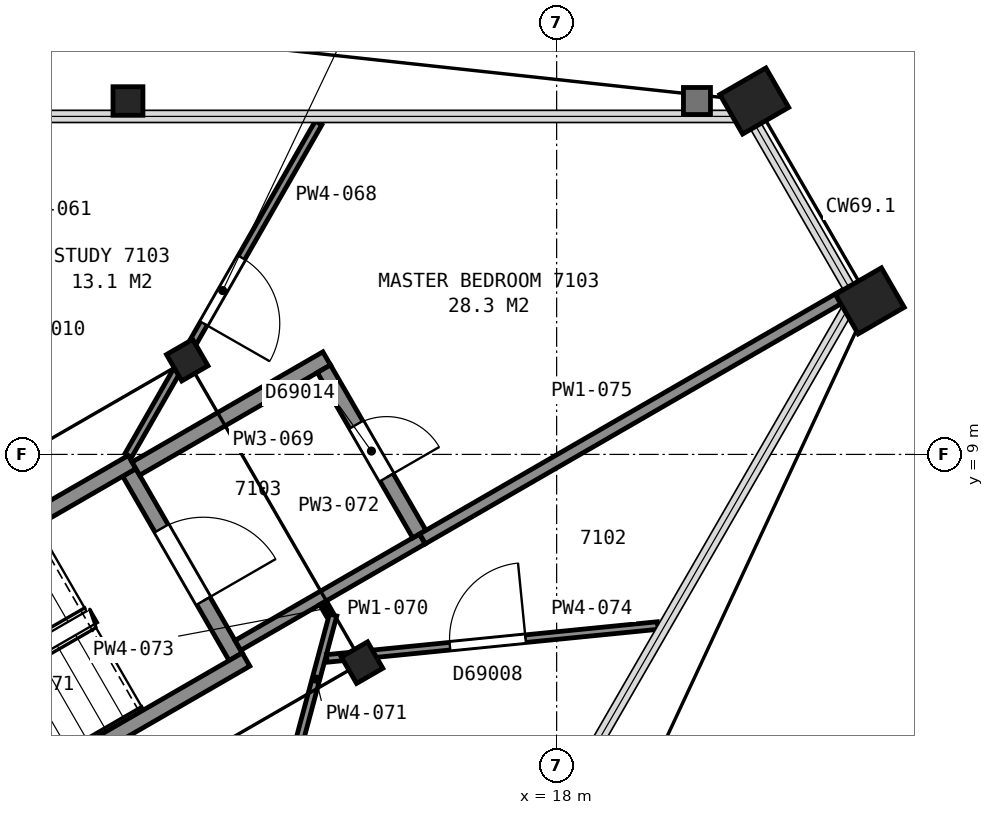
"""IFC4 building model, lengths in metres.
Left out: names, types, materials, properties, quantities, classifications, styles, units other than length and angle.
Written with IfcOpenShell. Run it as: python <this file> out.ifc"""

import sys

from ifc_helpers import new_model, si_unit, direction, frame, frame_2d, origin, origin_2d, place, context, subcontext, project, spatial, rectangle, hollow_rectangle, i_section, extrude, element, fill, save


model = new_model("IFC4")
c1 = context("Model", 3, precision=1e-05, world=origin(), true_north=direction((0.0, 1.0)))
c2 = subcontext(c1, "Body", "Model", "MODEL_VIEW")
j1 = project(units=[si_unit("LENGTHUNIT", "METRE"), si_unit("PLANEANGLEUNIT", "RADIAN")], contexts=[c1])
p1 = place(None, origin())
s1 = spatial("IfcSite", under=j1, at=p1, CompositionType="ELEMENT")
p2 = place(p1, origin())
s2 = spatial("IfcBuilding", under=s1, at=p2, CompositionType="ELEMENT")
p3 = place(p2, frame((0.0, 0.0, 282.5)))
s3 = spatial("IfcBuildingStorey", under=s2, at=p3, CompositionType="ELEMENT", Elevation=282.5)
p4 = place(p3, frame((20.6, 13.65, 0.0), z_axis=(0.0, 0.0, 1.0), x_axis=(0.5, -0.866025403784, 0.0)))
e1 = element("IfcColumn", 1, at=p4, inside=s3, PredefinedType="COLUMN", context=c2, shape_type="SweptSolid", body=[
    extrude(hollow_rectangle(XDim=0.6, YDim=0.7, WallThickness=0.04, at=origin_2d()), origin(), (0.0, 0.0, 1.0), 3.7),
])
p5 = place(p3, frame((12.36, 13.65, 0.0), z_axis=(0.0, 0.0, 1.0), x_axis=(1.0, 0.0, 0.0)))
e2 = element("IfcColumn", 2, at=p5, inside=s3, PredefinedType="COLUMN", context=c2, shape_type="SweptSolid", body=[
    extrude(i_section(OverallWidth=0.394, OverallDepth=0.376, WebThickness=0.017, FlangeThickness=0.028, FilletRadius=0.015, at=origin_2d()), origin(), (0.0, 0.0, 1.0), 3.7),
])
p6 = place(p3, frame((22.12, 11.02, 0.0), z_axis=(0.0, 0.0, 1.0), x_axis=(0.5, -0.866025403784, 0.0)))
e3 = element("IfcColumn", 3, at=p6, inside=s3, PredefinedType="COLUMN", context=c2, shape_type="SweptSolid", body=[
    extrude(hollow_rectangle(XDim=0.6, YDim=0.7, WallThickness=0.04, at=origin_2d()), origin(), (0.0, 0.0, 1.0), 3.7),
])
for number, where, z_axis, x_axis in (
    (4, (15.44, 6.26, 0.0), (0.0, 0.0, 1.0), (0.5, -0.866, 0.0)),
    (5, (13.14, 10.24, 0.0), (0.0, 0.0, 1.0), (0.5, -0.866, 0.0)),
):
    element("IfcColumn", number, at=place(p3, frame(where, z_axis=z_axis, x_axis=x_axis)), inside=s3, PredefinedType="COLUMN", context=c2, shape_type="SweptSolid", body=[
        extrude(i_section(OverallWidth=0.401, OverallDepth=0.399, WebThickness=0.025, FlangeThickness=0.04, FilletRadius=0.015, at=origin_2d()), origin(), (0.0, 0.0, 1.0), 3.7),
    ])
p7 = place(p3, frame((13.777, 6.338, 0.0), z_axis=(0.0, 0.0, 1.0), x_axis=(-0.500049511043, 0.865996816683, 0.0)))
e6 = element("IfcWall", 6, at=p7, inside=s3, PredefinedType="PARTITIONING", context=c2, shape_type="SweptSolid", body=[
    extrude(rectangle(XDim=2.8, YDim=0.2, at=frame_2d((1.4, 0.0))), origin(), (0.0, 0.0, 1.0), 3.45),
])
p8 = place(p7, frame((0.85, 0.0, 0.0)))
e7 = element("IfcOpeningElement", 7, at=p8, cuts=e6, PredefinedType="OPENING", context=c2, shape_type="SweptSolid", body=[
    extrude(rectangle(XDim=1.1, YDim=2.1, at=frame_2d((0.55, 1.05))), frame((0.0, 0.11, 0.0), z_axis=(0.0, -1.0, 0.0), x_axis=(1.0, 0.0, 0.0)), (0.0, 0.0, 1.0), 0.22),
])
for number, where, z_axis, x_axis in (
    (8, (6.178, 5.299, 0.0), (0.0, 0.0, 1.0), (0.866, 0.5, 0.0)),
    (9, (7.678, 2.701, 0.0), (0.0, 0.0, 1.0), (0.866, 0.5, 0.0)),
):
    element("IfcWall", number, at=place(p3, frame(where, z_axis=z_axis, x_axis=x_axis)), inside=s3, PredefinedType="PARTITIONING", context=c2, shape_type="SweptSolid", body=[
        extrude(rectangle(XDim=7.2, YDim=0.2, at=frame_2d((3.6, 0.0))), origin(), (0.0, 0.0, 1.0), 3.45),
    ])
p9 = place(p3, frame((14.868, 13.362, 0.0), z_axis=(0.0, 0.0, 1.0), x_axis=(-0.496681239155, -0.867933031214, 0.0)))
e10 = element("IfcWall", 10, at=p9, inside=s3, PredefinedType="PARTITIONING", context=c2, shape_type="SweptSolid", body=[
    extrude(rectangle(XDim=5.041, YDim=0.1, at=frame_2d((2.521, 0.0))), origin(), (0.0, 0.0, 1.0), 2.723),
])
p10 = place(p9, frame((2.041, 0.0, 0.0)))
e11 = element("IfcOpeningElement", 11, at=p10, cuts=e10, PredefinedType="OPENING", context=c2, shape_type="SweptSolid", body=[
    extrude(rectangle(XDim=1.0, YDim=2.1, at=frame_2d((0.5, 1.05))), frame((0.0, 0.06, 0.0), z_axis=(0.0, -1.0, 0.0), x_axis=(1.0, 0.0, 0.0)), (0.0, 0.0, 1.0), 0.12),
])
p11 = place(p3, frame((12.464, 8.813, 0.0), z_axis=(0.0, 0.0, 1.0), x_axis=(0.865948555758, 0.50013308107, 0.0)))
e12 = element("IfcWall", 12, at=p11, inside=s3, PredefinedType="PARTITIONING", context=c2, shape_type="SweptSolid", body=[
    extrude(rectangle(XDim=2.899, YDim=0.2, at=frame_2d((1.45, 0.0))), origin(), (0.0, 0.0, 1.0), 2.723),
])
p12 = place(p3, frame((13.806, 6.487, 0.0), z_axis=(0.0, 0.0, 1.0), x_axis=(0.866056369097, 0.49994636267, 0.0)))
e13 = element("IfcWall", 13, at=p12, inside=s3, PredefinedType="PARTITIONING", context=c2, shape_type="SweptSolid", body=[
    extrude(rectangle(XDim=2.8, YDim=0.15, at=frame_2d((1.4, 0.0))), origin(), (0.0, 0.0, 1.0), 2.723),
])
p13 = place(p3, frame((14.607, 5.2, 0.0), z_axis=(0.0, 0.0, 1.0), x_axis=(0.258549793661, 0.965997931777, 0.0)))
e14 = element("IfcWall", 14, at=p13, inside=s3, PredefinedType="PARTITIONING", context=c2, shape_type="SweptSolid", body=[
    extrude(rectangle(XDim=1.747, YDim=0.1, at=frame_2d((0.874, 0.0))), origin(), (0.0, 0.0, 1.0), 2.723),
])
p14 = place(p3, frame((16.194, 7.952, 0.0), z_axis=(0.0, 0.0, 1.0), x_axis=(-0.500039460523, 0.866002620042, 0.0)))
e15 = element("IfcWall", 15, at=p14, inside=s3, PredefinedType="PARTITIONING", context=c2, shape_type="SweptSolid", body=[
    extrude(rectangle(XDim=2.511, YDim=0.2, at=frame_2d((1.255, 0.0))), origin(), (0.0, 0.0, 1.0), 2.723),
])
p15 = place(p14, frame((0.861, 0.0, 0.0)))
e16 = element("IfcOpeningElement", 16, at=p15, cuts=e15, PredefinedType="OPENING", context=c2, shape_type="SweptSolid", body=[
    extrude(rectangle(XDim=0.8, YDim=2.1, at=frame_2d((0.4, 1.05))), frame((0.0, 0.11, 0.0), z_axis=(0.0, -1.0, 0.0), x_axis=(1.0, 0.0, 0.0)), (0.0, 0.0, 1.0), 0.22),
])
p16 = place(p3, frame((14.927, 7.047, 0.0), z_axis=(0.0, 0.0, 1.0), x_axis=(0.497687197367, -0.867356589631, 0.0)))
e17 = element("IfcWall", 17, at=p16, inside=s3, PredefinedType="PARTITIONING", context=c2, shape_type="SweptSolid", body=[
    extrude(rectangle(XDim=0.17, YDim=0.1, at=frame_2d((0.085, 0.0))), origin(), (0.0, 0.0, 1.0), 2.723),
])
p17 = place(p3, frame((14.976, 6.315, 0.0), z_axis=(0.0, 0.0, 1.0), x_axis=(0.995082940066, 0.09904515329, 0.0)))
e18 = element("IfcWall", 18, at=p17, inside=s3, PredefinedType="PARTITIONING", context=c2, shape_type="SweptSolid", body=[
    extrude(rectangle(XDim=4.375, YDim=0.1, at=frame_2d((2.188, 0.0))), origin(), (0.0, 0.0, 1.0), 2.723),
])
p18 = place(p17, frame((1.628, 0.0, 0.0)))
e19 = element("IfcOpeningElement", 19, at=p18, cuts=e18, PredefinedType="OPENING", context=c2, shape_type="SweptSolid", body=[
    extrude(rectangle(XDim=1.0, YDim=2.1, at=frame_2d((0.5, 1.05))), frame((0.0, 0.06, 0.0), z_axis=(0.0, -1.0, 0.0), x_axis=(1.0, 0.0, 0.0)), (0.0, 0.0, 1.0), 0.12),
])
p19 = place(p3, frame((16.236, 7.889, 0.0), z_axis=(0.0, 0.0, 1.0), x_axis=(0.865995456094, 0.500051867335, 0.0)))
e20 = element("IfcWall", 20, at=p19, inside=s3, PredefinedType="PARTITIONING", context=c2, shape_type="SweptSolid", body=[
    extrude(rectangle(XDim=6.415, YDim=0.15, at=frame_2d((3.208, 0.0))), origin(), (0.0, 0.0, 1.0), 2.723),
])
p20 = place(p8, origin())
e21 = element("IfcDoor", 21, at=p20, inside=s3, OperationType="SINGLE_SWING_LEFT", PredefinedType="DOOR", context=c2, shape_type="SweptSolid", body=[
    extrude(rectangle(XDim=1.1, YDim=2.1, at=frame_2d((0.55, 1.05))), frame((0.0, 0.025, 0.0), z_axis=(0.0, -1.0, 0.0), x_axis=(1.0, 0.0, 0.0)), (0.0, 0.0, 1.0), 0.05),
])
fill(e7, e21)
p21 = place(p10, origin())
e22 = element("IfcDoor", 22, at=p21, inside=s3, OperationType="SINGLE_SWING_RIGHT", PredefinedType="DOOR", context=c2, shape_type="SweptSolid", body=[
    extrude(rectangle(XDim=1.0, YDim=2.1, at=frame_2d((0.5, 1.05))), frame((0.0, 0.025, 0.0), z_axis=(0.0, -1.0, 0.0), x_axis=(1.0, 0.0, 0.0)), (0.0, 0.0, 1.0), 0.05),
])
fill(e11, e22)
p22 = place(p15, origin())
e23 = element("IfcDoor", 23, at=p22, inside=s3, OperationType="SINGLE_SWING_LEFT", PredefinedType="DOOR", context=c2, shape_type="SweptSolid", body=[
    extrude(rectangle(XDim=0.8, YDim=2.1, at=frame_2d((0.4, 1.05))), frame((0.0, 0.025, 0.0), z_axis=(0.0, -1.0, 0.0), x_axis=(1.0, 0.0, 0.0)), (0.0, 0.0, 1.0), 0.05),
])
fill(e16, e23)
p23 = place(p18, origin())
e24 = element("IfcDoor", 24, at=p23, inside=s3, OperationType="SINGLE_SWING_RIGHT", PredefinedType="DOOR", context=c2, shape_type="SweptSolid", body=[
    extrude(rectangle(XDim=1.0, YDim=2.1, at=frame_2d((0.5, 1.05))), frame((0.0, 0.025, 0.0), z_axis=(0.0, -1.0, 0.0), x_axis=(1.0, 0.0, 0.0)), (0.0, 0.0, 1.0), 0.05),
])
fill(e19, e24)
save(model, sys.argv[1])
